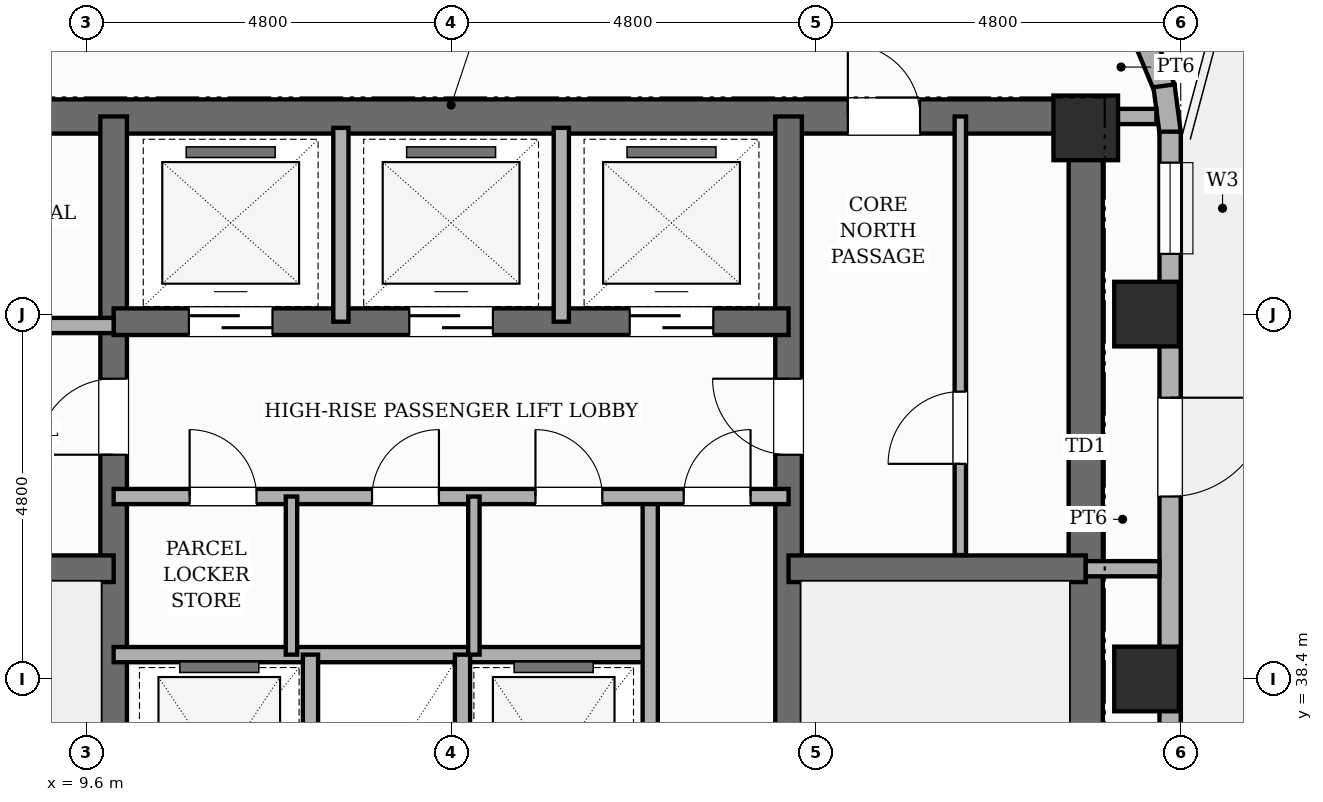
"""IFC4 building model, lengths in metres.
Left out: names, types, materials, properties, quantities, classifications, styles, units other than length and angle.
Written with IfcOpenShell. Run it as: python <this file> out.ifc"""

import sys

from ifc_helpers import new_model, si_unit, direction, frame, frame_2d, origin, origin_2d, place, context, subcontext, project, spatial, rectangle, extrude, element, fill, save


model = new_model("IFC4")
c1 = context("Model", 3, precision=1e-05, world=origin(), true_north=direction((0.0, 1.0)))
c2 = subcontext(c1, "Body", "Model", "MODEL_VIEW")
j1 = project(units=[si_unit("LENGTHUNIT", "METRE"), si_unit("PLANEANGLEUNIT", "RADIAN")], contexts=[c1])
p1 = place(None, origin())
s1 = spatial("IfcSite", under=j1, at=p1, CompositionType="ELEMENT")
p2 = place(p1, origin())
s2 = spatial("IfcBuilding", under=s1, at=p2, CompositionType="ELEMENT")
p3 = place(p2, frame((0.0, 0.0, 239.8)))
s3 = spatial("IfcBuildingStorey", under=s2, at=p3, CompositionType="ELEMENT", Elevation=239.8)
p4 = place(p3, frame((22.75, 30.675, 0.0), z_axis=(0.0, 0.0, 1.0), x_axis=(0.0, 1.0, 0.0)))
e1 = element("IfcWall", 1, at=p4, inside=s3, PredefinedType="SHEAR", context=c2, shape_type="SweptSolid", body=[
    extrude(rectangle(XDim=15.35, YDim=0.45, at=frame_2d((7.675, 0.0))), origin(), (0.0, 0.0, 1.0), 4.3),
])
p5 = place(p3, frame((6.05, 45.8, 0.0), z_axis=(0.0, 0.0, 1.0), x_axis=(1.0, 0.0, 0.0)))
e2 = element("IfcWall", 2, at=p5, inside=s3, PredefinedType="SHEAR", context=c2, shape_type="SweptSolid", body=[
    extrude(rectangle(XDim=16.7, YDim=0.45, at=frame_2d((8.35, 0.0))), origin(), (0.0, 0.0, 1.0), 4.3),
])
p6 = place(p5, frame((13.57, 0.0, 0.0)))
e3 = element("IfcOpeningElement", 3, at=p6, cuts=e2, PredefinedType="OPENING", context=c2, shape_type="SweptSolid", body=[
    extrude(rectangle(XDim=0.95, YDim=2.15, at=frame_2d((0.475, 1.075))), frame((0.0, 0.235, 0.0), z_axis=(0.0, -1.0, 0.0), x_axis=(1.0, 0.0, 0.0)), (0.0, 0.0, 1.0), 0.47),
])
p7 = place(p3, frame((9.96, 30.9, 0.0), z_axis=(0.0, 0.0, 1.0), x_axis=(0.0, 1.0, 0.0)))
e4 = element("IfcWall", 4, at=p7, inside=s3, PredefinedType="SHEAR", context=c2, shape_type="SweptSolid", body=[
    extrude(rectangle(XDim=14.9, YDim=0.35, at=frame_2d((7.45, 0.0))), origin(), (0.0, 0.0, 1.0), 4.3),
])
p8 = place(p7, frame((0.65, 0.0, 0.0)))
e5 = element("IfcOpeningElement", 5, at=p8, cuts=e4, PredefinedType="OPENING", context=c2, shape_type="SweptSolid", body=[
    extrude(rectangle(XDim=0.95, YDim=2.1, at=frame_2d((0.475, 1.05))), frame((0.0, 0.185, 0.0), z_axis=(0.0, -1.0, 0.0), x_axis=(1.0, 0.0, 0.0)), (0.0, 0.0, 1.0), 0.37),
])
p9 = place(p7, frame((10.45, 0.0, 0.0)))
e6 = element("IfcOpeningElement", 6, at=p9, cuts=e4, PredefinedType="OPENING", context=c2, shape_type="SweptSolid", body=[
    extrude(rectangle(XDim=1.0, YDim=2.15, at=frame_2d((0.5, 1.075))), frame((0.0, 0.185, 0.0), z_axis=(0.0, -1.0, 0.0), x_axis=(1.0, 0.0, 0.0)), (0.0, 0.0, 1.0), 0.37),
])
p10 = place(p3, frame((18.84, 30.9, 0.0), z_axis=(0.0, 0.0, 1.0), x_axis=(0.0, 1.0, 0.0)))
e7 = element("IfcWall", 7, at=p10, inside=s3, PredefinedType="SHEAR", context=c2, shape_type="SweptSolid", body=[
    extrude(rectangle(XDim=14.9, YDim=0.35, at=frame_2d((7.45, 0.0))), origin(), (0.0, 0.0, 1.0), 4.3),
])
p11 = place(p10, frame((0.65, 0.0, 0.0)))
e8 = element("IfcOpeningElement", 8, at=p11, cuts=e7, PredefinedType="OPENING", context=c2, shape_type="SweptSolid", body=[
    extrude(rectangle(XDim=0.95, YDim=2.1, at=frame_2d((0.475, 1.05))), frame((0.0, 0.185, 0.0), z_axis=(0.0, -1.0, 0.0), x_axis=(1.0, 0.0, 0.0)), (0.0, 0.0, 1.0), 0.37),
])
p12 = place(p10, frame((10.45, 0.0, 0.0)))
e9 = element("IfcOpeningElement", 9, at=p12, cuts=e7, PredefinedType="OPENING", context=c2, shape_type="SweptSolid", body=[
    extrude(rectangle(XDim=1.0, YDim=2.15, at=frame_2d((0.5, 1.075))), frame((0.0, 0.185, 0.0), z_axis=(0.0, -1.0, 0.0), x_axis=(1.0, 0.0, 0.0)), (0.0, 0.0, 1.0), 0.37),
])
for number, where, z_axis, x_axis in (
    (10, (6.05, 39.85, 0.0), (0.0, 0.0, 1.0), (1.0, 0.0, 0.0)),
    (11, (18.84, 39.85, 0.0), (0.0, 0.0, 1.0), (1.0, 0.0, 0.0)),
):
    element("IfcWall", number, at=place(p3, frame(where, z_axis=z_axis, x_axis=x_axis)), inside=s3, PredefinedType="SHEAR", context=c2, shape_type="SweptSolid", body=[
        extrude(rectangle(XDim=3.91, YDim=0.35, at=frame_2d((1.955, 0.0))), origin(), (0.0, 0.0, 1.0), 4.3),
    ])
p13 = place(p3, frame((9.96, 43.1, 0.0), z_axis=(0.0, 0.0, 1.0), x_axis=(1.0, 0.0, 0.0)))
e12 = element("IfcWall", 12, at=p13, inside=s3, PredefinedType="SHEAR", context=c2, shape_type="SweptSolid", body=[
    extrude(rectangle(XDim=8.88, YDim=0.35, at=frame_2d((4.44, 0.0))), origin(), (0.0, 0.0, 1.0), 4.3),
])
p14 = place(p13, frame((0.99, 0.0, 0.0)))
e13 = element("IfcOpeningElement", 13, at=p14, cuts=e12, PredefinedType="OPENING", context=c2, shape_type="SweptSolid", body=[
    extrude(rectangle(XDim=1.1, YDim=2.15, at=frame_2d((0.55, 1.075))), frame((0.0, 0.185, 0.0), z_axis=(0.0, -1.0, 0.0), x_axis=(1.0, 0.0, 0.0)), (0.0, 0.0, 1.0), 0.37),
])
p15 = place(p13, frame((3.89, 0.0, 0.0)))
e14 = element("IfcOpeningElement", 14, at=p15, cuts=e12, PredefinedType="OPENING", context=c2, shape_type="SweptSolid", body=[
    extrude(rectangle(XDim=1.1, YDim=2.15, at=frame_2d((0.55, 1.075))), frame((0.0, 0.185, 0.0), z_axis=(0.0, -1.0, 0.0), x_axis=(1.0, 0.0, 0.0)), (0.0, 0.0, 1.0), 0.37),
])
p16 = place(p13, frame((6.79, 0.0, 0.0)))
e15 = element("IfcOpeningElement", 15, at=p16, cuts=e12, PredefinedType="OPENING", context=c2, shape_type="SweptSolid", body=[
    extrude(rectangle(XDim=1.1, YDim=2.15, at=frame_2d((0.55, 1.075))), frame((0.0, 0.185, 0.0), z_axis=(0.0, -1.0, 0.0), x_axis=(1.0, 0.0, 0.0)), (0.0, 0.0, 1.0), 0.37),
])
for number, where, z_axis, x_axis in (
    (16, (22.75, 45.65, 0.0), (0.0, 0.0, 1.0), (1.0, 0.0, 0.0)),
    (17, (23.55, 38.4, 0.0), (0.0, 0.0, 1.0), (1.0, 0.0, 0.0)),
    (18, (23.55, 43.2, 0.0), (0.0, 0.0, 1.0), (1.0, 0.0, 0.0)),
):
    element("IfcColumn", number, at=place(p3, frame(where, z_axis=z_axis, x_axis=x_axis)), inside=s3, PredefinedType="COLUMN", context=c2, shape_type="SweptSolid", body=[
        extrude(rectangle(XDim=0.85, YDim=0.85, at=origin_2d()), origin(), (0.0, 0.0, 1.0), 4.3),
    ])
for number, where, z_axis, x_axis in (
    (19, (23.186, 47.212, 0.0), (0.0, 0.0, 1.0), (0.609, -0.793, 0.0)),
    (20, (23.549, 46.746, 0.0), (0.0, 0.0, 1.0), (0.382, -0.924, 0.0)),
    (21, (23.779, 46.203, 0.0), (0.0, 0.0, 1.0), (0.131, -0.991, 0.0)),
):
    element("IfcWall", number, at=place(p3, frame(where, z_axis=z_axis, x_axis=x_axis)), inside=s3, PredefinedType="STANDARD", context=c2, shape_type="SweptSolid", body=[
        extrude(rectangle(XDim=0.626, YDim=0.28, at=frame_2d((0.313, 0.0))), origin(), (0.0, 0.0, 1.0), 3.32),
    ])
p17 = place(p3, frame((23.86, 45.6, 0.0), z_axis=(0.0, 0.0, 1.0), x_axis=(0.0, -1.0, 0.0)))
e22 = element("IfcWall", 22, at=p17, inside=s3, PredefinedType="STANDARD", context=c2, shape_type="SweptSolid", body=[
    extrude(rectangle(XDim=33.6, YDim=0.28, at=frame_2d((16.8, 0.0))), origin(), (0.0, 0.0, 1.0), 3.32),
])
p18 = place(p17, frame((3.5, 0.0, 0.0)))
e23 = element("IfcOpeningElement", 23, at=p18, cuts=e22, PredefinedType="OPENING", context=c2, shape_type="SweptSolid", body=[
    extrude(rectangle(XDim=1.3, YDim=2.2, at=frame_2d((0.65, 1.1))), frame((0.0, 0.15, 0.0), z_axis=(0.0, -1.0, 0.0), x_axis=(1.0, 0.0, 0.0)), (0.0, 0.0, 1.0), 0.3),
])
p19 = place(p17, frame((23.45, 0.0, 0.0)))
e24 = element("IfcOpeningElement", 24, at=p19, cuts=e22, PredefinedType="OPENING", context=c2, shape_type="SweptSolid", body=[
    extrude(rectangle(XDim=1.1, YDim=2.15, at=frame_2d((0.55, 1.075))), frame((0.0, 0.15, 0.0), z_axis=(0.0, -1.0, 0.0), x_axis=(1.0, 0.0, 0.0)), (0.0, 0.0, 1.0), 0.3),
])
p20 = place(p17, frame((22.505, 0.0, 0.45)))
e25 = element("IfcOpeningElement", 25, at=p20, cuts=e22, PredefinedType="OPENING", context=c2, shape_type="SweptSolid", body=[
    extrude(rectangle(XDim=0.6, YDim=1.8, at=frame_2d((0.3, 0.9))), frame((0.0, 0.15, 0.0), z_axis=(0.0, -1.0, 0.0), x_axis=(1.0, 0.0, 0.0)), (0.0, 0.0, 1.0), 0.3),
])
p21 = place(p17, frame((0.407, 0.0, 0.8)))
e26 = element("IfcOpeningElement", 26, at=p21, cuts=e22, PredefinedType="OPENING", context=c2, shape_type="SweptSolid", body=[
    extrude(rectangle(XDim=1.2, YDim=1.8, at=frame_2d((0.6, 0.9))), frame((0.0, 0.15, 0.0), z_axis=(0.0, -1.0, 0.0), x_axis=(1.0, 0.0, 0.0)), (0.0, 0.0, 1.0), 0.3),
])
p22 = place(p17, frame((29.477, 0.0, 0.8)))
e27 = element("IfcOpeningElement", 27, at=p22, cuts=e22, PredefinedType="OPENING", context=c2, shape_type="SweptSolid", body=[
    extrude(rectangle(XDim=0.95, YDim=1.8, at=frame_2d((0.475, 0.9))), frame((0.0, 0.15, 0.0), z_axis=(0.0, -1.0, 0.0), x_axis=(1.0, 0.0, 0.0)), (0.0, 0.0, 1.0), 0.3),
])
p23 = place(p17, frame((20.133, 0.0, 0.45)))
e28 = element("IfcOpeningElement", 28, at=p23, cuts=e22, PredefinedType="OPENING", context=c2, shape_type="SweptSolid", body=[
    extrude(rectangle(XDim=0.75, YDim=1.8, at=frame_2d((0.375, 0.9))), frame((0.0, 0.15, 0.0), z_axis=(0.0, -1.0, 0.0), x_axis=(1.0, 0.0, 0.0)), (0.0, 0.0, 1.0), 0.3),
])
p24 = place(p3, frame((9.96, 38.72, 0.0), z_axis=(0.0, 0.0, 1.0), x_axis=(1.0, 0.0, 0.0)))
e29 = element("IfcWall", 29, at=p24, inside=s3, PredefinedType="POLYGONAL", context=c2, shape_type="SweptSolid", body=[
    extrude(rectangle(XDim=7.06, YDim=0.2, at=frame_2d((3.53, 0.0))), origin(), (0.0, 0.0, 1.0), 4.04),
])
for number, where, z_axis, x_axis in (
    (30, (12.55, 35.65, 0.0), (0.0, 0.0, 1.0), (0.0, 1.0, 0.0)),
    (31, (14.55, 35.65, 0.0), (0.0, 0.0, 1.0), (0.0, 1.0, 0.0)),
):
    element("IfcWall", number, at=place(p3, frame(where, z_axis=z_axis, x_axis=x_axis)), inside=s3, PredefinedType="POLYGONAL", context=c2, shape_type="SweptSolid", body=[
        extrude(rectangle(XDim=3.07, YDim=0.2, at=frame_2d((1.535, 0.0))), origin(), (0.0, 0.0, 1.0), 4.04),
    ])
p25 = place(p3, frame((17.02, 35.65, 0.0), z_axis=(0.0, 0.0, 1.0), x_axis=(0.0, 1.0, 0.0)))
e32 = element("IfcWall", 32, at=p25, inside=s3, PredefinedType="POLYGONAL", context=c2, shape_type="SweptSolid", body=[
    extrude(rectangle(XDim=5.15, YDim=0.2, at=frame_2d((2.575, 0.0))), origin(), (0.0, 0.0, 1.0), 4.04),
])
p26 = place(p3, frame((9.96, 40.8, 0.0), z_axis=(0.0, 0.0, 1.0), x_axis=(1.0, 0.0, 0.0)))
e33 = element("IfcWall", 33, at=p26, inside=s3, PredefinedType="POLYGONAL", context=c2, shape_type="SweptSolid", body=[
    extrude(rectangle(XDim=8.88, YDim=0.2, at=frame_2d((4.44, 0.0))), origin(), (0.0, 0.0, 1.0), 4.04),
])
p27 = place(p26, frame((7.5, 0.0, 0.0)))
e34 = element("IfcOpeningElement", 34, at=p27, cuts=e33, PredefinedType="OPENING", context=c2, shape_type="SweptSolid", body=[
    extrude(rectangle(XDim=0.88, YDim=2.1, at=frame_2d((0.44, 1.05))), frame((0.0, 0.11, 0.0), z_axis=(0.0, -1.0, 0.0), x_axis=(1.0, 0.0, 0.0)), (0.0, 0.0, 1.0), 0.22),
])
p28 = place(p26, frame((1.0, 0.0, 0.0)))
e35 = element("IfcOpeningElement", 35, at=p28, cuts=e33, PredefinedType="OPENING", context=c2, shape_type="SweptSolid", body=[
    extrude(rectangle(XDim=0.88, YDim=2.1, at=frame_2d((0.44, 1.05))), frame((0.0, 0.11, 0.0), z_axis=(0.0, -1.0, 0.0), x_axis=(1.0, 0.0, 0.0)), (0.0, 0.0, 1.0), 0.22),
])
p29 = place(p26, frame((3.4, 0.0, 0.0)))
e36 = element("IfcOpeningElement", 36, at=p29, cuts=e33, PredefinedType="OPENING", context=c2, shape_type="SweptSolid", body=[
    extrude(rectangle(XDim=0.88, YDim=2.1, at=frame_2d((0.44, 1.05))), frame((0.0, 0.11, 0.0), z_axis=(0.0, -1.0, 0.0), x_axis=(1.0, 0.0, 0.0)), (0.0, 0.0, 1.0), 0.22),
])
p30 = place(p26, frame((5.55, 0.0, 0.0)))
e37 = element("IfcOpeningElement", 37, at=p30, cuts=e33, PredefinedType="OPENING", context=c2, shape_type="SweptSolid", body=[
    extrude(rectangle(XDim=0.88, YDim=2.1, at=frame_2d((0.44, 1.05))), frame((0.0, 0.11, 0.0), z_axis=(0.0, -1.0, 0.0), x_axis=(1.0, 0.0, 0.0)), (0.0, 0.0, 1.0), 0.22),
])
p31 = place(p3, frame((21.1, 40.03, 0.0), z_axis=(0.0, 0.0, 1.0), x_axis=(0.0, 1.0, 0.0)))
e38 = element("IfcWall", 38, at=p31, inside=s3, PredefinedType="PARTITIONING", context=c2, shape_type="SweptSolid", body=[
    extrude(rectangle(XDim=5.77, YDim=0.15, at=frame_2d((2.885, 0.0))), origin(), (0.0, 0.0, 1.0), 4.04),
])
p32 = place(p31, frame((1.2, 0.0, 0.0)))
e39 = element("IfcOpeningElement", 39, at=p32, cuts=e38, PredefinedType="OPENING", context=c2, shape_type="SweptSolid", body=[
    extrude(rectangle(XDim=0.95, YDim=2.15, at=frame_2d((0.475, 1.075))), frame((0.0, 0.085, 0.0), z_axis=(0.0, -1.0, 0.0), x_axis=(1.0, 0.0, 0.0)), (0.0, 0.0, 1.0), 0.17),
])
p33 = place(p3, frame((22.75, 39.85, 0.0), z_axis=(0.0, 0.0, 1.0), x_axis=(1.0, 0.0, 0.0)))
e40 = element("IfcWall", 40, at=p33, inside=s3, PredefinedType="POLYGONAL", context=c2, shape_type="SweptSolid", body=[
    extrude(rectangle(XDim=0.97, YDim=0.2, at=frame_2d((0.485, 0.0))), origin(), (0.0, 0.0, 1.0), 4.04),
])
p34 = place(p3, frame((22.75, 45.8, 0.0), z_axis=(0.0, 0.0, 1.0), x_axis=(1.0, 0.0, 0.0)))
e41 = element("IfcWall", 41, at=p34, inside=s3, PredefinedType="POLYGONAL", context=c2, shape_type="SweptSolid", body=[
    extrude(rectangle(XDim=0.93, YDim=0.2, at=frame_2d((0.465, 0.0))), origin(), (0.0, 0.0, 1.0), 4.04),
])
p35 = place(p3, frame((6.05, 43.05, 0.0), z_axis=(0.0, 0.0, 1.0), x_axis=(1.0, 0.0, 0.0)))
e42 = element("IfcWall", 42, at=p35, inside=s3, PredefinedType="POLYGONAL", context=c2, shape_type="SweptSolid", body=[
    extrude(rectangle(XDim=3.91, YDim=0.2, at=frame_2d((1.955, 0.0))), origin(), (0.0, 0.0, 1.0), 3.32),
])
p36 = place(p35, frame((1.35, 0.0, 0.0)))
e43 = element("IfcOpeningElement", 43, at=p36, cuts=e42, PredefinedType="OPENING", context=c2, shape_type="SweptSolid", body=[
    extrude(rectangle(XDim=0.88, YDim=2.1, at=frame_2d((0.44, 1.05))), frame((0.0, 0.11, 0.0), z_axis=(0.0, -1.0, 0.0), x_axis=(1.0, 0.0, 0.0)), (0.0, 0.0, 1.0), 0.22),
])
for number, where, z_axis, x_axis in (
    (44, (12.95, 43.1, 0.0), (0.0, 0.0, 1.0), (0.0, 1.0, 0.0)),
    (45, (15.85, 43.1, 0.0), (0.0, 0.0, 1.0), (0.0, 1.0, 0.0)),
):
    element("IfcWall", number, at=place(p3, frame(where, z_axis=z_axis, x_axis=x_axis)), inside=s3, PredefinedType="POLYGONAL", context=c2, shape_type="SweptSolid", body=[
        extrude(rectangle(XDim=2.55, YDim=0.2, at=frame_2d((1.275, 0.0))), origin(), (0.0, 0.0, 1.0), 4.04),
    ])
for number, where, z_axis, x_axis in (
    (46, (12.3, 38.72, 0.0), (0.0, 0.0, 1.0), (0.0, 1.0, 0.0)),
    (47, (14.7, 38.72, 0.0), (0.0, 0.0, 1.0), (0.0, 1.0, 0.0)),
):
    element("IfcWall", number, at=place(p3, frame(where, z_axis=z_axis, x_axis=x_axis)), inside=s3, PredefinedType="PARTITIONING", context=c2, shape_type="SweptSolid", body=[
        extrude(rectangle(XDim=2.08, YDim=0.15, at=frame_2d((1.04, 0.0))), origin(), (0.0, 0.0, 1.0), 4.04),
    ])
p37 = place(p18, origin())
e48 = element("IfcDoor", 48, at=p37, inside=s3, OperationType="SINGLE_SWING_LEFT", PredefinedType="DOOR", context=c2, shape_type="SweptSolid", body=[
    extrude(rectangle(XDim=1.3, YDim=2.2, at=frame_2d((0.65, 1.1))), frame((0.0, 0.025, 0.0), z_axis=(0.0, -1.0, 0.0), x_axis=(1.0, 0.0, 0.0)), (0.0, 0.0, 1.0), 0.05),
])
fill(e23, e48)
p38 = place(p21, origin())
e49 = element("IfcWindow", 49, at=p38, inside=s3, PartitioningType="SINGLE_PANEL", PredefinedType="WINDOW", context=c2, shape_type="SweptSolid", body=[
    extrude(rectangle(XDim=1.2, YDim=1.8, at=frame_2d((0.6, 0.9))), frame((0.0, 0.03, 0.0), z_axis=(0.0, -1.0, 0.0), x_axis=(1.0, 0.0, 0.0)), (0.0, 0.0, 1.0), 0.06),
])
fill(e26, e49)
p39 = place(p27, origin())
e50 = element("IfcDoor", 50, at=p39, inside=s3, OperationType="SINGLE_SWING_RIGHT", PredefinedType="DOOR", context=c2, shape_type="SweptSolid", body=[
    extrude(rectangle(XDim=0.88, YDim=2.1, at=frame_2d((0.44, 1.05))), frame((0.0, 0.025, 0.0), z_axis=(0.0, -1.0, 0.0), x_axis=(1.0, 0.0, 0.0)), (0.0, 0.0, 1.0), 0.05),
])
fill(e34, e50)
p40 = place(p14, origin())
e51 = element("IfcDoor", 51, at=p40, inside=s3, OperationType="SLIDING_TO_LEFT", PredefinedType="DOOR", context=c2, shape_type="SweptSolid", body=[
    extrude(rectangle(XDim=1.1, YDim=2.15, at=frame_2d((0.55, 1.075))), frame((0.0, 0.025, 0.0), z_axis=(0.0, -1.0, 0.0), x_axis=(1.0, 0.0, 0.0)), (0.0, 0.0, 1.0), 0.05),
])
fill(e13, e51)
p41 = place(p15, origin())
e52 = element("IfcDoor", 52, at=p41, inside=s3, OperationType="SLIDING_TO_RIGHT", PredefinedType="DOOR", context=c2, shape_type="SweptSolid", body=[
    extrude(rectangle(XDim=1.1, YDim=2.15, at=frame_2d((0.55, 1.075))), frame((0.0, 0.025, 0.0), z_axis=(0.0, -1.0, 0.0), x_axis=(1.0, 0.0, 0.0)), (0.0, 0.0, 1.0), 0.05),
])
fill(e14, e52)
p42 = place(p16, origin())
e53 = element("IfcDoor", 53, at=p42, inside=s3, OperationType="SLIDING_TO_LEFT", PredefinedType="DOOR", context=c2, shape_type="SweptSolid", body=[
    extrude(rectangle(XDim=1.1, YDim=2.15, at=frame_2d((0.55, 1.075))), frame((0.0, 0.025, 0.0), z_axis=(0.0, -1.0, 0.0), x_axis=(1.0, 0.0, 0.0)), (0.0, 0.0, 1.0), 0.05),
])
fill(e15, e53)
p43 = place(p9, origin())
e54 = element("IfcDoor", 54, at=p43, inside=s3, OperationType="SINGLE_SWING_LEFT", PredefinedType="DOOR", context=c2, shape_type="SweptSolid", body=[
    extrude(rectangle(XDim=1.0, YDim=2.15, at=frame_2d((0.5, 1.075))), frame((0.0, 0.025, 0.0), z_axis=(0.0, -1.0, 0.0), x_axis=(1.0, 0.0, 0.0)), (0.0, 0.0, 1.0), 0.05),
])
fill(e6, e54)
p44 = place(p12, origin())
e55 = element("IfcDoor", 55, at=p44, inside=s3, OperationType="SINGLE_SWING_RIGHT", PredefinedType="DOOR", context=c2, shape_type="SweptSolid", body=[
    extrude(rectangle(XDim=1.0, YDim=2.15, at=frame_2d((0.5, 1.075))), frame((0.0, 0.025, 0.0), z_axis=(0.0, -1.0, 0.0), x_axis=(1.0, 0.0, 0.0)), (0.0, 0.0, 1.0), 0.05),
])
fill(e9, e55)
p45 = place(p6, origin())
e56 = element("IfcDoor", 56, at=p45, inside=s3, OperationType="SINGLE_SWING_LEFT", PredefinedType="DOOR", context=c2, shape_type="SweptSolid", body=[
    extrude(rectangle(XDim=0.95, YDim=2.15, at=frame_2d((0.475, 1.075))), frame((0.0, 0.025, 0.0), z_axis=(0.0, -1.0, 0.0), x_axis=(1.0, 0.0, 0.0)), (0.0, 0.0, 1.0), 0.05),
])
fill(e3, e56)
p46 = place(p32, origin())
e57 = element("IfcDoor", 57, at=p46, inside=s3, OperationType="SINGLE_SWING_LEFT", PredefinedType="DOOR", context=c2, shape_type="SweptSolid", body=[
    extrude(rectangle(XDim=0.95, YDim=2.15, at=frame_2d((0.475, 1.075))), frame((0.0, 0.025, 0.0), z_axis=(0.0, -1.0, 0.0), x_axis=(1.0, 0.0, 0.0)), (0.0, 0.0, 1.0), 0.05),
])
fill(e39, e57)
p47 = place(p28, origin())
e58 = element("IfcDoor", 58, at=p47, inside=s3, OperationType="SINGLE_SWING_LEFT", PredefinedType="DOOR", context=c2, shape_type="SweptSolid", body=[
    extrude(rectangle(XDim=0.88, YDim=2.1, at=frame_2d((0.44, 1.05))), frame((0.0, 0.025, 0.0), z_axis=(0.0, -1.0, 0.0), x_axis=(1.0, 0.0, 0.0)), (0.0, 0.0, 1.0), 0.05),
])
fill(e35, e58)
p48 = place(p29, origin())
e59 = element("IfcDoor", 59, at=p48, inside=s3, OperationType="SINGLE_SWING_RIGHT", PredefinedType="DOOR", context=c2, shape_type="SweptSolid", body=[
    extrude(rectangle(XDim=0.88, YDim=2.1, at=frame_2d((0.44, 1.05))), frame((0.0, 0.025, 0.0), z_axis=(0.0, -1.0, 0.0), x_axis=(1.0, 0.0, 0.0)), (0.0, 0.0, 1.0), 0.05),
])
fill(e36, e59)
p49 = place(p30, origin())
e60 = element("IfcDoor", 60, at=p49, inside=s3, OperationType="SINGLE_SWING_LEFT", PredefinedType="DOOR", context=c2, shape_type="SweptSolid", body=[
    extrude(rectangle(XDim=0.88, YDim=2.1, at=frame_2d((0.44, 1.05))), frame((0.0, 0.025, 0.0), z_axis=(0.0, -1.0, 0.0), x_axis=(1.0, 0.0, 0.0)), (0.0, 0.0, 1.0), 0.05),
])
fill(e37, e60)
save(model, sys.argv[1])
